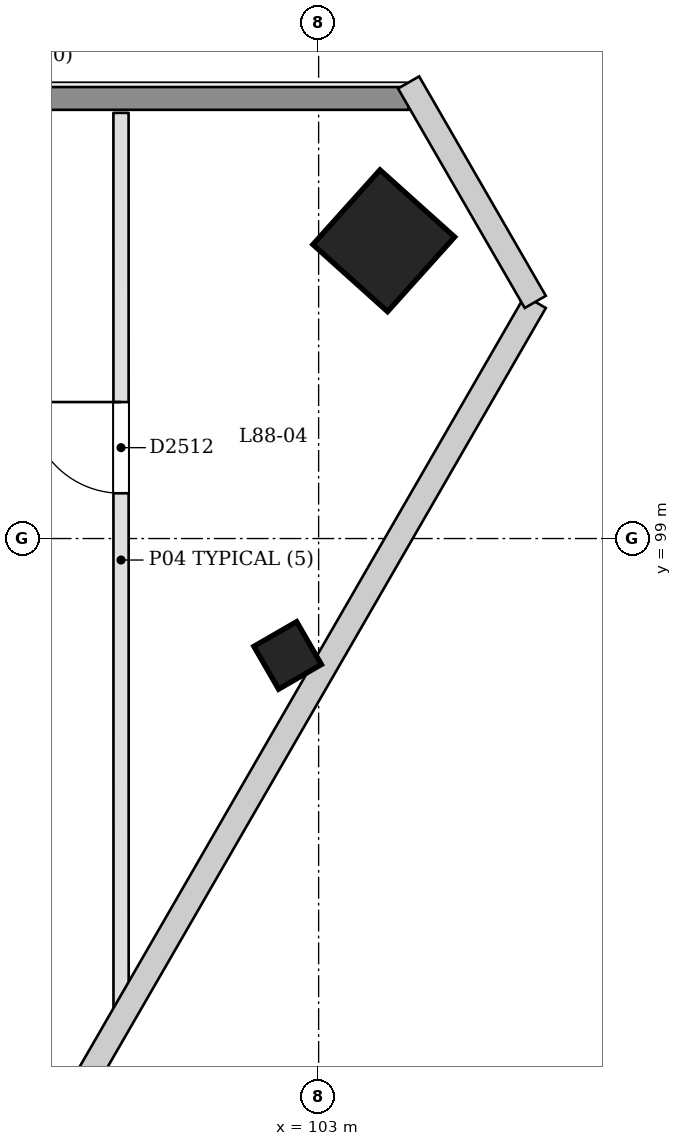
"""IFC4 building model, lengths in metres.
Left out: names, types, materials, properties, quantities, classifications, styles, units other than length and angle.
Written with IfcOpenShell. Run it as: python <this file> out.ifc"""

import sys

from ifc_helpers import new_model, si_unit, direction, frame, frame_2d, origin, origin_2d, place, context, subcontext, project, spatial, rectangle, extrude, element, fill, save


model = new_model("IFC4")
c1 = context("Model", 3, precision=1e-05, world=origin(), true_north=direction((0.0, 1.0)))
c2 = subcontext(c1, "Body", "Model", "MODEL_VIEW")
j1 = project(units=[si_unit("LENGTHUNIT", "METRE"), si_unit("PLANEANGLEUNIT", "RADIAN")], contexts=[c1])
p1 = place(None, origin())
s1 = spatial("IfcSite", under=j1, at=p1, CompositionType="ELEMENT")
p2 = place(p1, origin())
s2 = spatial("IfcBuilding", under=s1, at=p2, CompositionType="ELEMENT")
p3 = place(p2, frame((0.0, 0.0, 338.8)))
s3 = spatial("IfcBuildingStorey", under=s2, at=p3, CompositionType="ELEMENT", Elevation=338.8)
p4 = place(p3, frame((103.891, 102.906, 0.0), z_axis=(-0.028412585289, 0.009238447977, 0.999553588396), x_axis=(0.500310820387, -0.865560678856, 0.022221481085)))
e1 = element("IfcColumn", 1, at=p4, inside=s3, PredefinedType="COLUMN", context=c2, shape_type="SweptSolid", body=[
    extrude(rectangle(XDim=1.32, YDim=1.32, at=origin_2d()), origin(), (0.0, 0.0, 1.0), 4.202),
])
p5 = place(p3, frame((102.619, 97.415, -0.02), z_axis=(-0.022252955841, 0.038436923726, 0.999013217556), x_axis=(-0.499207906907, -0.866197617944, 0.022207033775)))
e2 = element("IfcColumn", 2, at=p5, inside=s3, PredefinedType="COLUMN", context=c2, shape_type="SweptSolid", body=[
    extrude(rectangle(XDim=0.65, YDim=0.65, at=origin_2d()), origin(), (0.0, 0.0, 1.0), 4.224),
])
p6 = place(p3, frame((100.401, 92.834, 0.0), z_axis=(0.0, 0.0, 1.0), x_axis=(-8.3001328e-05, 0.999999996555, 0.0)))
e3 = element("IfcWall", 3, at=p6, inside=s3, PredefinedType="PARTITIONING", context=c2, shape_type="SweptSolid", body=[
    extrude(rectangle(XDim=11.766, YDim=0.2, at=frame_2d((5.883, 0.0))), origin(), (0.0, 0.0, 1.0), 3.9),
])
p7 = place(p6, frame((6.761, 0.0, 0.0)))
e4 = element("IfcOpeningElement", 4, at=p7, cuts=e3, PredefinedType="OPENING", context=c2, shape_type="SweptSolid", body=[
    extrude(rectangle(XDim=1.2, YDim=2.4, at=frame_2d((0.6, 1.2))), frame((0.0, 0.11, 0.0), z_axis=(0.0, -1.0, 0.0), x_axis=(1.0, 0.0, 0.0)), (0.0, 0.0, 1.0), 0.221),
])
p8 = place(p3, frame((65.816, 104.79, 0.0), z_axis=(0.0, 0.0, 1.0), x_axis=(1.0, 0.0, 0.0)))
e5 = element("IfcWall", 5, at=p8, inside=s3, PredefinedType="SOLIDWALL", context=c2, shape_type="SweptSolid", body=[
    extrude(rectangle(XDim=38.367, YDim=0.3, at=frame_2d((19.184, 0.0))), origin(), (0.0, 0.0, 1.0), 3.9),
])
p9 = place(p7, origin())
e6 = element("IfcDoor", 6, at=p9, inside=s3, OperationType="SINGLE_SWING_RIGHT", PredefinedType="NOTDEFINED", context=c2, shape_type="SweptSolid", body=[
    extrude(rectangle(XDim=1.2, YDim=2.4, at=frame_2d((0.6, 1.2))), frame((0.0, 0.025, 0.0), z_axis=(0.0, -1.0, 0.0), x_axis=(1.0, 0.0, 0.0)), (0.0, 0.0, 1.0), 0.05),
])
fill(e4, e6)
save(model, sys.argv[1])
